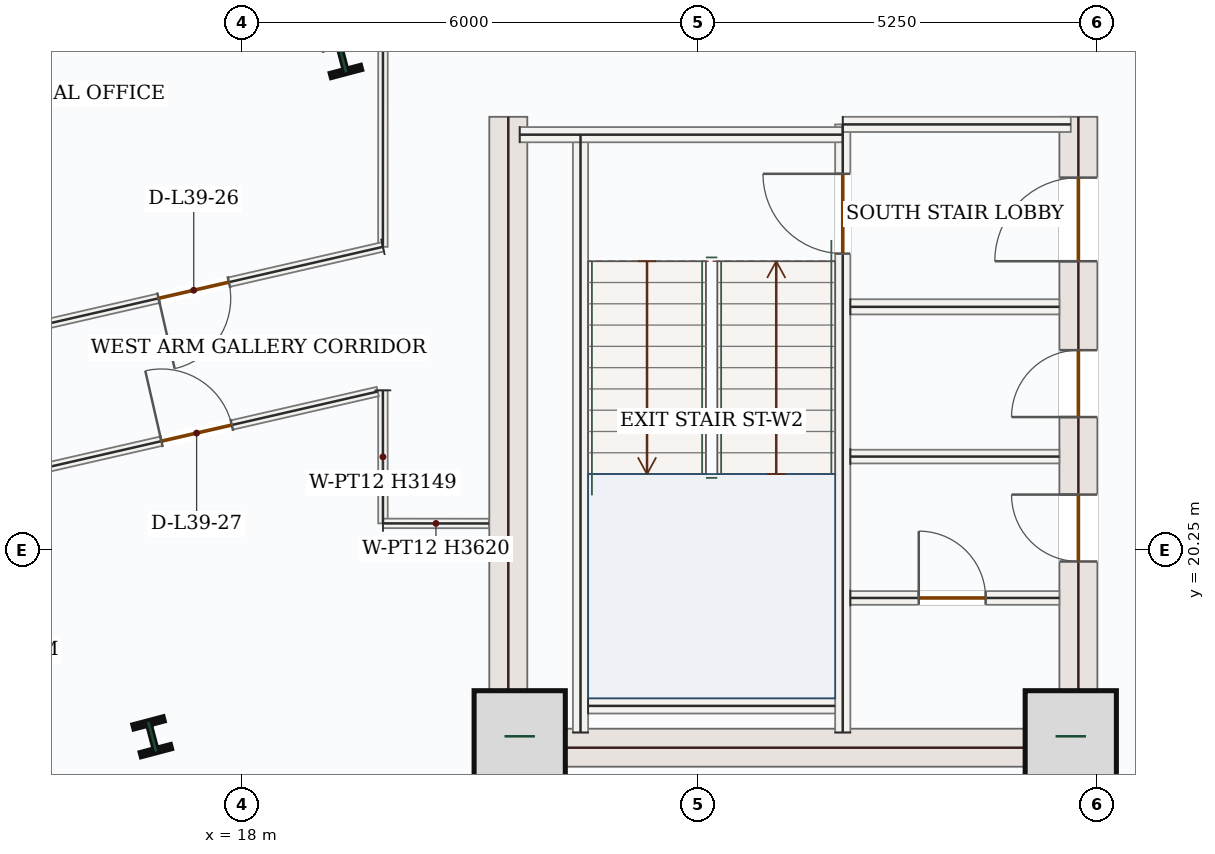
"""IFC4 building model, lengths in metres.
Left out: names, types, materials, properties, quantities, classifications, styles, units other than length and angle.
Written with IfcOpenShell. Run it as: python <this file> out.ifc"""

import sys

from ifc_helpers import new_model, si_unit, direction, frame, frame_2d, origin, origin_2d, place, context, subcontext, project, spatial, rectangle, i_section, extrude, source, transform, mapped, element, fill, save


model = new_model("IFC4")
c1 = context("Model", 3, precision=1e-05, world=origin(), true_north=direction((0.0, 1.0)))
c2 = subcontext(c1, "Body", "Model", "MODEL_VIEW")
j1 = project(units=[si_unit("LENGTHUNIT", "METRE"), si_unit("PLANEANGLEUNIT", "RADIAN")], contexts=[c1])
p1 = place(None, origin())
s1 = spatial("IfcSite", under=j1, at=p1, CompositionType="ELEMENT")
p2 = place(p1, origin())
s2 = spatial("IfcBuilding", under=s1, at=p2, CompositionType="ELEMENT")
p3 = place(p2, frame((0.0, 0.0, 170.7)))
s3 = spatial("IfcBuildingStorey", under=s2, at=p3, CompositionType="ELEMENT", Elevation=170.7)
m1 = source(origin(), c2, "Body", "SweptSolid", [
    extrude(rectangle(XDim=8.55, YDim=0.5, at=frame_2d((4.275, 0.0))), origin(), (0.0, 0.0, 1.0), 3.62),
])
p4 = place(p3, frame((21.5, 17.4, 0.0), z_axis=(0.0, 0.0, 1.0), x_axis=(0.0, 1.0, 0.0)))
e1 = element("IfcWall", 1, at=p4, inside=s3, PredefinedType="SHEAR", context=c2, shape_type="MappedRepresentation", body=[
    mapped(m1, transform((0.0, 0.0, 0.0), x_axis=(1.0, 0.0, 0.0), y_axis=(0.0, 1.0, 0.0), z_axis=(0.0, 0.0, 1.0), scale=1.0)),
])
p5 = place(p3, frame((29.0, 17.4, 0.0), z_axis=(0.0, 0.0, 1.0), x_axis=(0.0, 1.0, 0.0)))
e2 = element("IfcWall", 2, at=p5, inside=s3, PredefinedType="SHEAR", context=c2, shape_type="SweptSolid", body=[
    extrude(rectangle(XDim=8.55, YDim=0.5, at=frame_2d((4.275, 0.0))), origin(), (0.0, 0.0, 1.0), 3.62),
])
p6 = place(p5, frame((6.65, 0.0, 0.0)))
e3 = element("IfcOpeningElement", 3, at=p6, cuts=e2, PredefinedType="OPENING", context=c2, shape_type="SweptSolid", body=[
    extrude(rectangle(XDim=1.1, YDim=2.2, at=frame_2d((0.55, 1.1))), frame((0.0, 0.26, 0.0), z_axis=(0.0, -1.0, 0.0), x_axis=(1.0, 0.0, 0.0)), (0.0, 0.0, 1.0), 0.52),
])
p7 = place(p5, frame((2.7, 0.0, 0.0)))
e4 = element("IfcOpeningElement", 4, at=p7, cuts=e2, PredefinedType="OPENING", context=c2, shape_type="SweptSolid", body=[
    extrude(rectangle(XDim=0.88, YDim=2.1, at=frame_2d((0.44, 1.05))), frame((0.0, 0.26, 0.0), z_axis=(0.0, -1.0, 0.0), x_axis=(1.0, 0.0, 0.0)), (0.0, 0.0, 1.0), 0.52),
])
p8 = place(p5, frame((4.6, 0.0, 0.0)))
e5 = element("IfcOpeningElement", 5, at=p8, cuts=e2, PredefinedType="OPENING", context=c2, shape_type="SweptSolid", body=[
    extrude(rectangle(XDim=0.88, YDim=2.1, at=frame_2d((0.44, 1.05))), frame((0.0, 0.26, 0.0), z_axis=(0.0, -1.0, 0.0), x_axis=(1.0, 0.0, 0.0)), (0.0, 0.0, 1.0), 0.52),
])
m2 = source(origin(), c2, "Body", "SweptSolid", [
    extrude(rectangle(XDim=7.0, YDim=0.5, at=frame_2d((3.5, 0.0))), origin(), (0.0, 0.0, 1.0), 3.62),
])
p9 = place(p3, frame((21.75, 17.65, 0.0), z_axis=(0.0, 0.0, 1.0), x_axis=(1.0, 0.0, 0.0)))
e6 = element("IfcWall", 6, at=p9, inside=s3, PredefinedType="SHEAR", context=c2, shape_type="MappedRepresentation", body=[
    mapped(m2, transform((0.0, 0.0, 0.0), x_axis=(1.0, 0.0, 0.0), y_axis=(0.0, 1.0, 0.0), z_axis=(0.0, 0.0, 1.0), scale=1.0)),
])
m3 = source(origin(), c2, "Body", "SweptSolid", [
    extrude(rectangle(XDim=1.2, YDim=1.2, at=origin_2d()), origin(), (0.0, 0.0, 1.0), 3.9),
])
for number, where, z_axis, x_axis in (
    (7, (21.65, 17.8, 0.0), (0.0, 0.0, 1.0), (1.0, 0.0, 0.0)),
    (8, (28.9, 17.8, 0.0), (0.0, 0.0, 1.0), (1.0, 0.0, 0.0)),
):
    element("IfcColumn", number, at=place(p3, frame(where, z_axis=z_axis, x_axis=x_axis)), inside=s3, PredefinedType="COLUMN", context=c2, shape_type="MappedRepresentation", body=[
        mapped(m3, transform((0.0, 0.0, 0.0), x_axis=(1.0, 0.0, 0.0), y_axis=(0.0, 1.0, 0.0), z_axis=(0.0, 0.0, 1.0), scale=1.0)),
    ])
m4 = source(origin(), c2, "Body", "SweptSolid", [
    extrude(i_section(OverallWidth=0.412, OverallDepth=0.435, WebThickness=0.036, FlangeThickness=0.057, FilletRadius=0.018, at=origin_2d()), origin(), (0.0, 0.0, 1.0), 3.9),
])
for number, where, z_axis, x_axis in (
    (9, (19.316, 26.729, 0.0), (0.0, 0.0, 1.0), (0.967, 0.255, 0.0)),
    (10, (16.815, 17.794, 0.0), (0.0, 0.0, 1.0), (0.967, 0.255, 0.0)),
):
    element("IfcColumn", number, at=place(p3, frame(where, z_axis=z_axis, x_axis=x_axis)), inside=s3, PredefinedType="COLUMN", context=c2, shape_type="MappedRepresentation", body=[
        mapped(m4, transform((0.0, 0.0, 0.0), x_axis=(1.0, 0.0, 0.0), y_axis=(0.0, 1.0, 0.0), z_axis=(0.0, 0.0, 1.0), scale=1.0)),
    ])
m5 = source(origin(), c2, "Body", "SweptSolid", [
    extrude(rectangle(XDim=7.87, YDim=0.2, at=frame_2d((3.935, 0.0))), origin(), (0.0, 0.0, 1.0), 3.62),
])
p10 = place(p3, frame((22.45, 17.85, 0.0), z_axis=(0.0, 0.0, 1.0), x_axis=(0.0, 1.0, 0.0)))
e11 = element("IfcWall", 11, at=p10, inside=s3, PredefinedType="SOLIDWALL", context=c2, shape_type="MappedRepresentation", body=[
    mapped(m5, transform((0.0, 0.0, 0.0), x_axis=(1.0, 0.0, 0.0), y_axis=(0.0, 1.0, 0.0), z_axis=(0.0, 0.0, 1.0), scale=1.0)),
])
p11 = place(p3, frame((25.9, 17.85, 0.0), z_axis=(0.0, 0.0, 1.0), x_axis=(0.0, 1.0, 0.0)))
e12 = element("IfcWall", 12, at=p11, inside=s3, PredefinedType="SOLIDWALL", context=c2, shape_type="SweptSolid", body=[
    extrude(rectangle(XDim=8.0, YDim=0.2, at=frame_2d((4.0, 0.0))), origin(), (0.0, 0.0, 1.0), 3.62),
])
p12 = place(p11, frame((6.3, 0.0, 0.0)))
e13 = element("IfcOpeningElement", 13, at=p12, cuts=e12, PredefinedType="OPENING", context=c2, shape_type="SweptSolid", body=[
    extrude(rectangle(XDim=1.05, YDim=2.15, at=frame_2d((0.525, 1.075))), frame((0.0, 0.11, 0.0), z_axis=(0.0, -1.0, 0.0), x_axis=(1.0, 0.0, 0.0)), (0.0, 0.0, 1.0), 0.22),
])
m6 = source(origin(), c2, "Body", "SweptSolid", [
    extrude(rectangle(XDim=4.25, YDim=0.2, at=frame_2d((2.125, 0.0))), origin(), (0.0, 0.0, 1.0), 3.62),
])
p13 = place(p3, frame((21.65, 25.715, 0.0), z_axis=(0.0, 0.0, 1.0), x_axis=(1.0, 0.0, 0.0)))
e14 = element("IfcWall", 14, at=p13, inside=s3, PredefinedType="SOLIDWALL", context=c2, shape_type="MappedRepresentation", body=[
    mapped(m6, transform((0.0, 0.0, 0.0), x_axis=(1.0, 0.0, 0.0), y_axis=(0.0, 1.0, 0.0), z_axis=(0.0, 0.0, 1.0), scale=1.0)),
])
m7 = source(origin(), c2, "Body", "SweptSolid", [
    extrude(rectangle(XDim=3.0, YDim=0.2, at=frame_2d((1.5, 0.0))), origin(), (0.0, 0.0, 1.0), 3.62),
])
p14 = place(p3, frame((25.9, 25.85, 0.0), z_axis=(0.0, 0.0, 1.0), x_axis=(1.0, 0.0, 0.0)))
e15 = element("IfcWall", 15, at=p14, inside=s3, PredefinedType="SOLIDWALL", context=c2, shape_type="MappedRepresentation", body=[
    mapped(m7, transform((0.0, 0.0, 0.0), x_axis=(1.0, 0.0, 0.0), y_axis=(0.0, 1.0, 0.0), z_axis=(0.0, 0.0, 1.0), scale=1.0)),
])
m8 = source(origin(), c2, "Body", "SweptSolid", [
    extrude(rectangle(XDim=3.25, YDim=0.2, at=frame_2d((1.625, 0.0))), origin(), (0.0, 0.0, 1.0), 3.62),
])
p15 = place(p3, frame((22.55, 18.2, 0.0), z_axis=(0.0, 0.0, 1.0), x_axis=(1.0, 0.0, 0.0)))
e16 = element("IfcWall", 16, at=p15, inside=s3, PredefinedType="SOLIDWALL", context=c2, shape_type="MappedRepresentation", body=[
    mapped(m8, transform((0.0, 0.0, 0.0), x_axis=(1.0, 0.0, 0.0), y_axis=(0.0, 1.0, 0.0), z_axis=(0.0, 0.0, 1.0), scale=1.0)),
])
m9 = source(origin(), c2, "Body", "SweptSolid", [
    extrude(rectangle(XDim=2.75, YDim=0.2, at=frame_2d((1.375, 0.0))), origin(), (0.0, 0.0, 1.0), 3.62),
])
p16 = place(p3, frame((26.0, 23.45, 0.0), z_axis=(0.0, 0.0, 1.0), x_axis=(1.0, 0.0, 0.0)))
e17 = element("IfcWall", 17, at=p16, inside=s3, PredefinedType="SOLIDWALL", context=c2, shape_type="MappedRepresentation", body=[
    mapped(m9, transform((0.0, 0.0, 0.0), x_axis=(1.0, 0.0, 0.0), y_axis=(0.0, 1.0, 0.0), z_axis=(0.0, 0.0, 1.0), scale=1.0)),
])
p17 = place(p3, frame((26.0, 19.62, 0.0), z_axis=(0.0, 0.0, 1.0), x_axis=(1.0, 0.0, 0.0)))
e18 = element("IfcWall", 18, at=p17, inside=s3, PredefinedType="PARTITIONING", context=c2, shape_type="SweptSolid", body=[
    extrude(rectangle(XDim=2.75, YDim=0.18, at=frame_2d((1.375, 0.0))), origin(), (0.0, 0.0, 1.0), 3.62),
])
p18 = place(p17, frame((0.9, 0.0, 0.0)))
e19 = element("IfcOpeningElement", 19, at=p18, cuts=e18, PredefinedType="OPENING", context=c2, shape_type="SweptSolid", body=[
    extrude(rectangle(XDim=0.88, YDim=2.1, at=frame_2d((0.44, 1.05))), frame((0.0, 0.1, 0.0), z_axis=(0.0, -1.0, 0.0), x_axis=(1.0, 0.0, 0.0)), (0.0, 0.0, 1.0), 0.2),
])
m10 = source(origin(), c2, "Body", "SweptSolid", [
    extrude(rectangle(XDim=2.75, YDim=0.18, at=frame_2d((1.375, 0.0))), origin(), (0.0, 0.0, 1.0), 3.62),
])
p19 = place(p3, frame((26.0, 21.48, 0.0), z_axis=(0.0, 0.0, 1.0), x_axis=(1.0, 0.0, 0.0)))
e20 = element("IfcWall", 20, at=p19, inside=s3, PredefinedType="PARTITIONING", context=c2, shape_type="MappedRepresentation", body=[
    mapped(m10, transform((0.0, 0.0, 0.0), x_axis=(1.0, 0.0, 0.0), y_axis=(0.0, 1.0, 0.0), z_axis=(0.0, 0.0, 1.0), scale=1.0)),
])
m11 = source(origin(), c2, "Body", "SweptSolid", [
    extrude(rectangle(XDim=9.16, YDim=0.125, at=frame_2d((4.58, 0.0))), origin(), (0.0, 0.0, 1.0), 2.766),
])
p20 = place(p3, frame((19.854, 33.399, 0.0), z_axis=(0.0, 0.0, 1.0), x_axis=(-0.000399776093, -0.99999992009, 0.0)))
e21 = element("IfcWall", 21, at=p20, inside=s3, PredefinedType="PARTITIONING", context=c2, shape_type="MappedRepresentation", body=[
    mapped(m11, transform((0.0, 0.0, 0.0), x_axis=(1.0, 0.0, 0.0), y_axis=(0.0, 1.0, 0.0), z_axis=(0.0, 0.0, 1.0), scale=1.0)),
])
p21 = place(p3, frame((19.85, 24.239, 0.0), z_axis=(0.0, 0.0, 1.0), x_axis=(-0.974685214681, -0.223581600949, 0.0)))
e22 = element("IfcWall", 22, at=p21, inside=s3, PredefinedType="PARTITIONING", context=c2, shape_type="SweptSolid", body=[
    extrude(rectangle(XDim=10.396, YDim=0.125, at=frame_2d((5.198, 0.0))), origin(), (0.0, 0.0, 1.0), 3.62),
])
p22 = place(p21, frame((2.078, 0.0, 0.0)))
e23 = element("IfcOpeningElement", 23, at=p22, cuts=e22, PredefinedType="OPENING", context=c2, shape_type="SweptSolid", body=[
    extrude(rectangle(XDim=0.95, YDim=2.15, at=frame_2d((0.475, 1.075))), frame((0.0, 0.073, 0.0), z_axis=(0.0, -1.0, 0.0), x_axis=(1.0, 0.0, 0.0)), (0.0, 0.0, 1.0), 0.145),
])
m12 = source(origin(), c2, "Body", "SweptSolid", [
    extrude(rectangle(XDim=1.75, YDim=0.125, at=frame_2d((0.875, 0.0))), origin(), (0.0, 0.0, 1.0), 3.149),
])
p23 = place(p3, frame((19.85, 22.351, 0.0), z_axis=(0.0, 0.0, 1.0), x_axis=(0.000557957787, -0.999999844342, 0.0)))
e24 = element("IfcWall", 24, at=p23, inside=s3, PredefinedType="PARTITIONING", context=c2, shape_type="MappedRepresentation", body=[
    mapped(m12, transform((0.0, 0.0, 0.0), x_axis=(1.0, 0.0, 0.0), y_axis=(0.0, 1.0, 0.0), z_axis=(0.0, 0.0, 1.0), scale=1.0)),
])
m13 = source(origin(), c2, "Body", "SweptSolid", [
    extrude(rectangle(XDim=1.394, YDim=0.125, at=frame_2d((0.697, 0.0))), origin(), (0.0, 0.0, 1.0), 3.62),
])
p24 = place(p3, frame((19.851, 20.601, 0.0), z_axis=(0.0, 0.0, 1.0), x_axis=(0.999999754632, -0.000700525222, 0.0)))
e25 = element("IfcWall", 25, at=p24, inside=s3, PredefinedType="PARTITIONING", context=c2, shape_type="MappedRepresentation", body=[
    mapped(m13, transform((0.0, 0.0, 0.0), x_axis=(1.0, 0.0, 0.0), y_axis=(0.0, 1.0, 0.0), z_axis=(0.0, 0.0, 1.0), scale=1.0)),
])
p25 = place(p3, frame((10.128, 20.121, 0.0), z_axis=(0.0, 0.0, 1.0), x_axis=(0.974684890892, 0.223583012474, 0.0)))
e26 = element("IfcWall", 26, at=p25, inside=s3, PredefinedType="PARTITIONING", context=c2, shape_type="SweptSolid", body=[
    extrude(rectangle(XDim=9.905, YDim=0.125, at=frame_2d((4.953, 0.0))), origin(), (0.0, 0.0, 1.0), 3.62),
])
p26 = place(p25, frame((6.985, 0.0, 0.0)))
e27 = element("IfcOpeningElement", 27, at=p26, cuts=e26, PredefinedType="OPENING", context=c2, shape_type="SweptSolid", body=[
    extrude(rectangle(XDim=0.95, YDim=2.15, at=frame_2d((0.475, 1.075))), frame((0.0, 0.073, 0.0), z_axis=(0.0, -1.0, 0.0), x_axis=(1.0, 0.0, 0.0)), (0.0, 0.0, 1.0), 0.145),
])
m14 = source(origin(), c2, "Body", "SweptSolid", [
    extrude(rectangle(XDim=1.05, YDim=2.15, at=frame_2d((0.525, 1.075))), frame((0.0, 0.025, 0.0), z_axis=(0.0, -1.0, 0.0), x_axis=(1.0, 0.0, 0.0)), (0.0, 0.0, 1.0), 0.05),
])
p27 = place(p12, origin())
e28 = element("IfcDoor", 28, at=p27, inside=s3, OperationType="SINGLE_SWING_RIGHT", PredefinedType="DOOR", context=c2, shape_type="MappedRepresentation", body=[
    mapped(m14, transform((0.0, 0.0, 0.0), x_axis=(1.0, 0.0, 0.0), y_axis=(0.0, 1.0, 0.0), z_axis=(0.0, 0.0, 1.0), scale=1.0)),
])
fill(e13, e28)
m15 = source(origin(), c2, "Body", "SweptSolid", [
    extrude(rectangle(XDim=1.1, YDim=2.2, at=frame_2d((0.55, 1.1))), frame((0.0, 0.025, 0.0), z_axis=(0.0, -1.0, 0.0), x_axis=(1.0, 0.0, 0.0)), (0.0, 0.0, 1.0), 0.05),
])
p28 = place(p6, origin())
e29 = element("IfcDoor", 29, at=p28, inside=s3, OperationType="SINGLE_SWING_LEFT", PredefinedType="DOOR", context=c2, shape_type="MappedRepresentation", body=[
    mapped(m15, transform((0.0, 0.0, 0.0), x_axis=(1.0, 0.0, 0.0), y_axis=(0.0, 1.0, 0.0), z_axis=(0.0, 0.0, 1.0), scale=1.0)),
])
fill(e3, e29)
m16 = source(origin(), c2, "Body", "SweptSolid", [
    extrude(rectangle(XDim=0.88, YDim=2.1, at=frame_2d((0.44, 1.05))), frame((0.0, 0.025, 0.0), z_axis=(0.0, -1.0, 0.0), x_axis=(1.0, 0.0, 0.0)), (0.0, 0.0, 1.0), 0.05),
])
p29 = place(p18, origin())
e30 = element("IfcDoor", 30, at=p29, inside=s3, OperationType="SINGLE_SWING_LEFT", PredefinedType="DOOR", context=c2, shape_type="MappedRepresentation", body=[
    mapped(m16, transform((0.0, 0.0, 0.0), x_axis=(1.0, 0.0, 0.0), y_axis=(0.0, 1.0, 0.0), z_axis=(0.0, 0.0, 1.0), scale=1.0)),
])
fill(e19, e30)
p30 = place(p7, origin())
e31 = element("IfcDoor", 31, at=p30, inside=s3, OperationType="SINGLE_SWING_RIGHT", PredefinedType="DOOR", context=c2, shape_type="MappedRepresentation", body=[
    mapped(m16, transform((0.0, 0.0, 0.0), x_axis=(1.0, 0.0, 0.0), y_axis=(0.0, 1.0, 0.0), z_axis=(0.0, 0.0, 1.0), scale=1.0)),
])
fill(e4, e31)
p31 = place(p8, origin())
e32 = element("IfcDoor", 32, at=p31, inside=s3, OperationType="SINGLE_SWING_LEFT", PredefinedType="DOOR", context=c2, shape_type="MappedRepresentation", body=[
    mapped(m16, transform((0.0, 0.0, 0.0), x_axis=(1.0, 0.0, 0.0), y_axis=(0.0, 1.0, 0.0), z_axis=(0.0, 0.0, 1.0), scale=1.0)),
])
fill(e5, e32)
m17 = source(origin(), c2, "Body", "SweptSolid", [
    extrude(rectangle(XDim=0.95, YDim=2.15, at=frame_2d((0.475, 1.075))), frame((0.0, 0.025, 0.0), z_axis=(0.0, -1.0, 0.0), x_axis=(1.0, 0.0, 0.0)), (0.0, 0.0, 1.0), 0.05),
])
p32 = place(p22, origin())
e33 = element("IfcDoor", 33, at=p32, inside=s3, OperationType="SINGLE_SWING_RIGHT", PredefinedType="DOOR", context=c2, shape_type="MappedRepresentation", body=[
    mapped(m17, transform((0.0, 0.0, 0.0), x_axis=(1.0, 0.0, 0.0), y_axis=(0.0, 1.0, 0.0), z_axis=(0.0, 0.0, 1.0), scale=1.0)),
])
fill(e23, e33)
p33 = place(p26, origin())
e34 = element("IfcDoor", 34, at=p33, inside=s3, OperationType="SINGLE_SWING_LEFT", PredefinedType="DOOR", context=c2, shape_type="MappedRepresentation", body=[
    mapped(m17, transform((0.0, 0.0, 0.0), x_axis=(1.0, 0.0, 0.0), y_axis=(0.0, 1.0, 0.0), z_axis=(0.0, 0.0, 1.0), scale=1.0)),
])
fill(e27, e34)
save(model, sys.argv[1])
